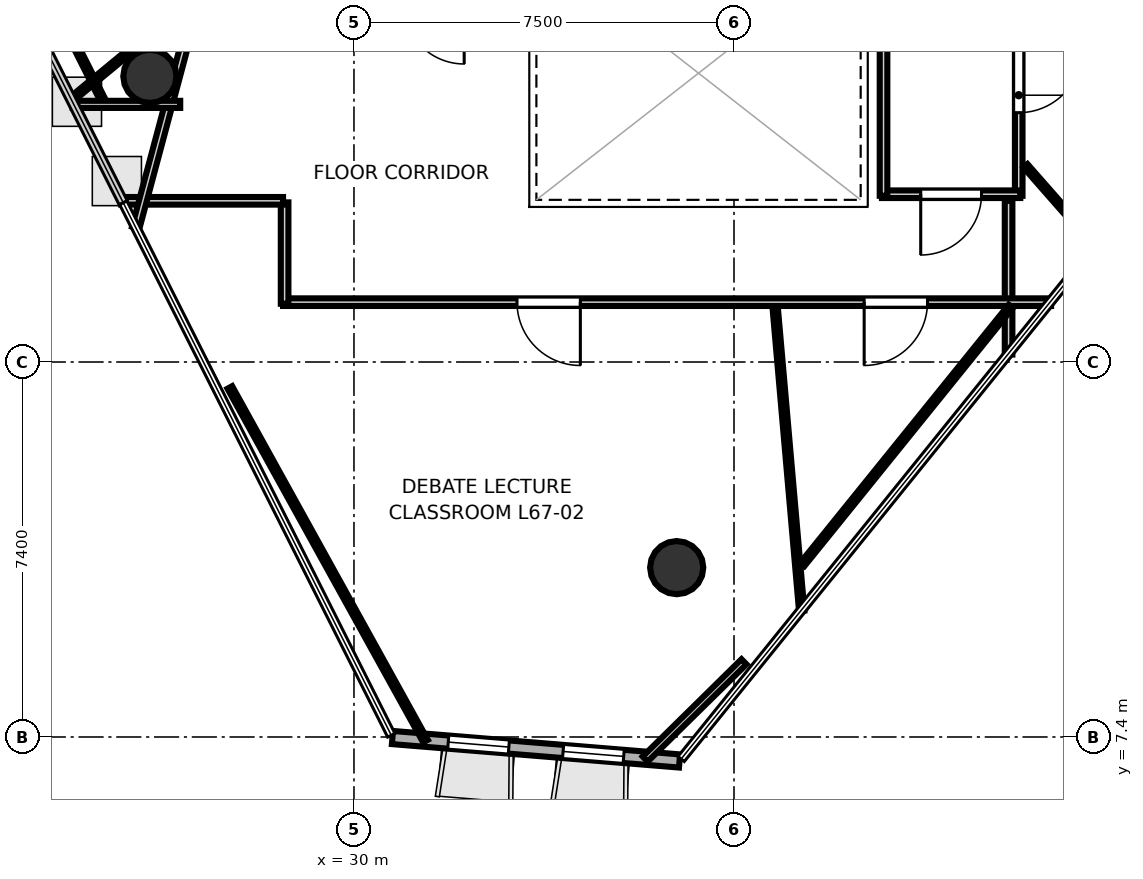
"""IFC4 building model, lengths in metres.
Left out: names, types, materials, properties, quantities, classifications, styles, units other than length and angle.
Written with IfcOpenShell. Run it as: python <this file> out.ifc"""

import sys

from ifc_helpers import new_model, si_unit, direction, frame, frame_2d, origin, origin_2d, place, context, subcontext, project, spatial, rectangle, hollow_circle, extrude, element, fill, save


model = new_model("IFC4")
c1 = context("Model", 3, precision=1e-05, world=origin(), true_north=direction((0.0, 1.0)))
c2 = subcontext(c1, "Body", "Model", "MODEL_VIEW")
j1 = project(units=[si_unit("LENGTHUNIT", "METRE"), si_unit("PLANEANGLEUNIT", "RADIAN")], contexts=[c1])
p1 = place(None, origin())
s1 = spatial("IfcSite", under=j1, at=p1, CompositionType="ELEMENT")
p2 = place(p1, origin())
s2 = spatial("IfcBuilding", under=s1, at=p2, CompositionType="ELEMENT")
p3 = place(p2, frame((0.0, 0.0, 261.2)))
s3 = spatial("IfcBuildingStorey", under=s2, at=p3, CompositionType="ELEMENT", Elevation=261.2)
for number, where, z_axis, x_axis in (
    (1, (25.972, 20.437, 0.0), (0.0, 0.0, 1.0), (1.0, 0.0, 0.0)),
    (2, (36.369, 10.742, 0.0), (0.0, 0.0, 1.0), (1.0, 0.0, 0.0)),
):
    element("IfcColumn", number, at=place(p3, frame(where, z_axis=z_axis, x_axis=x_axis)), inside=s3, PredefinedType="COLUMN", context=c2, shape_type="SweptSolid", body=[
        extrude(hollow_circle(Radius=0.525, WallThickness=0.028, at=origin_2d()), origin(), (0.0, 0.0, 1.0), 3.7),
    ])
p4 = place(p3, frame((30.759, 7.389, 0.0), z_axis=(0.0, 0.0, 1.0), x_axis=(0.996686463462, -0.081339372708, 0.0)))
e3 = element("IfcWall", 3, at=p4, inside=s3, PredefinedType="SOLIDWALL", context=c2, shape_type="SweptSolid", body=[
    extrude(rectangle(XDim=5.685, YDim=0.26, at=frame_2d((2.842, 0.0))), origin(), (0.0, 0.0, 1.0), 3.52),
])
p5 = place(p4, frame((1.105, 0.0, 0.9)))
e4 = element("IfcOpeningElement", 4, at=p5, cuts=e3, PredefinedType="OPENING", context=c2, shape_type="SweptSolid", body=[
    extrude(rectangle(XDim=1.2, YDim=2.0, at=frame_2d((0.6, 1.0))), frame((0.0, 0.14, 0.0), z_axis=(0.0, -1.0, 0.0), x_axis=(1.0, 0.0, 0.0)), (0.0, 0.0, 1.0), 0.28),
])
p6 = place(p4, frame((3.379, 0.0, 0.9)))
e5 = element("IfcOpeningElement", 5, at=p6, cuts=e3, PredefinedType="OPENING", context=c2, shape_type="SweptSolid", body=[
    extrude(rectangle(XDim=1.2, YDim=2.0, at=frame_2d((0.6, 1.0))), frame((0.0, 0.14, 0.0), z_axis=(0.0, -1.0, 0.0), x_axis=(1.0, 0.0, 0.0)), (0.0, 0.0, 1.0), 0.28),
])
p7 = place(p3, frame((43.119, 22.05, 0.0), z_axis=(0.0, 0.0, 1.0), x_axis=(0.0, -1.0, 0.0)))
e6 = element("IfcWall", 6, at=p7, inside=s3, PredefinedType="PARTITIONING", context=c2, shape_type="SweptSolid", body=[
    extrude(rectangle(XDim=3.97, YDim=0.15, at=frame_2d((1.985, 0.0))), origin(), (0.0, 0.0, 1.0), 2.84),
])
p8 = place(p7, frame((1.08, 0.0, 0.0)))
e7 = element("IfcOpeningElement", 7, at=p8, cuts=e6, PredefinedType="OPENING", context=c2, shape_type="SweptSolid", body=[
    extrude(rectangle(XDim=1.25, YDim=2.2, at=frame_2d((0.625, 1.1))), frame((0.0, 0.085, 0.0), z_axis=(0.0, -1.0, 0.0), x_axis=(1.0, 0.0, 0.0)), (0.0, 0.0, 1.0), 0.17),
])
p9 = place(p3, frame((43.15, 18.111, 0.0), z_axis=(0.0, 0.0, 1.0), x_axis=(-1.0, 0.0, 0.0)))
e8 = element("IfcWall", 8, at=p9, inside=s3, PredefinedType="PARTITIONING", context=c2, shape_type="SweptSolid", body=[
    extrude(rectangle(XDim=2.73, YDim=0.15, at=frame_2d((1.365, 0.0))), origin(), (0.0, 0.0, 1.0), 2.84),
])
p10 = place(p9, frame((0.765, 0.0, 0.0)))
e9 = element("IfcOpeningElement", 9, at=p10, cuts=e8, PredefinedType="OPENING", context=c2, shape_type="SweptSolid", body=[
    extrude(rectangle(XDim=1.2, YDim=2.15, at=frame_2d((0.6, 1.075))), frame((0.0, 0.085, 0.0), z_axis=(0.0, -1.0, 0.0), x_axis=(1.0, 0.0, 0.0)), (0.0, 0.0, 1.0), 0.17),
])
p11 = place(p3, frame((40.451, 18.08, 0.0), z_axis=(0.0, 0.0, 1.0), x_axis=(0.0, 1.0, 0.0)))
e10 = element("IfcWall", 10, at=p11, inside=s3, PredefinedType="PARTITIONING", context=c2, shape_type="SweptSolid", body=[
    extrude(rectangle(XDim=3.32, YDim=0.15, at=frame_2d((1.66, 0.0))), origin(), (0.0, 0.0, 1.0), 2.84),
])
p12 = place(p3, frame((42.919, 17.98, 0.0), z_axis=(0.0, 0.0, 1.0), x_axis=(0.0, -1.0, 0.0)))
e11 = element("IfcWall", 11, at=p12, inside=s3, PredefinedType="PARTITIONING", context=c2, shape_type="SweptSolid", body=[
    extrude(rectangle(XDim=3.032, YDim=0.15, at=frame_2d((1.516, 0.0))), origin(), (0.0, 0.0, 1.0), 2.84),
])
p13 = place(p3, frame((43.758, 15.981, 0.0), z_axis=(0.0, 0.0, 1.0), x_axis=(-1.0, 0.0, 0.0)))
e12 = element("IfcWall", 12, at=p13, inside=s3, PredefinedType="PARTITIONING", context=c2, shape_type="SweptSolid", body=[
    extrude(rectangle(XDim=15.158, YDim=0.15, at=frame_2d((7.579, 0.0))), origin(), (0.0, 0.0, 1.0), 2.84),
])
p14 = place(p13, frame((9.29, 0.0, 0.0)))
e13 = element("IfcOpeningElement", 13, at=p14, cuts=e12, PredefinedType="OPENING", context=c2, shape_type="SweptSolid", body=[
    extrude(rectangle(XDim=1.25, YDim=2.2, at=frame_2d((0.625, 1.1))), frame((0.0, 0.085, 0.0), z_axis=(0.0, -1.0, 0.0), x_axis=(1.0, 0.0, 0.0)), (0.0, 0.0, 1.0), 0.17),
])
p15 = place(p13, frame((2.439, 0.0, 0.0)))
e14 = element("IfcOpeningElement", 14, at=p15, cuts=e12, PredefinedType="OPENING", context=c2, shape_type="SweptSolid", body=[
    extrude(rectangle(XDim=1.25, YDim=2.2, at=frame_2d((0.625, 1.1))), frame((0.0, 0.085, 0.0), z_axis=(0.0, -1.0, 0.0), x_axis=(1.0, 0.0, 0.0)), (0.0, 0.0, 1.0), 0.17),
])
p16 = place(p3, frame((28.631, 15.95, 0.0), z_axis=(0.0, 0.0, 1.0), x_axis=(0.0, 1.0, 0.0)))
e15 = element("IfcWall", 15, at=p16, inside=s3, PredefinedType="PARTITIONING", context=c2, shape_type="SweptSolid", body=[
    extrude(rectangle(XDim=2.0, YDim=0.15, at=frame_2d((1.0, 0.0))), origin(), (0.0, 0.0, 1.0), 2.84),
])
p17 = place(p3, frame((28.6, 17.981, 0.0), z_axis=(0.0, 0.0, 1.0), x_axis=(-1.0, 0.0, 0.0)))
e16 = element("IfcWall", 16, at=p17, inside=s3, PredefinedType="PARTITIONING", context=c2, shape_type="SweptSolid", body=[
    extrude(rectangle(XDim=3.193, YDim=0.15, at=frame_2d((1.596, 0.0))), origin(), (0.0, 0.0, 1.0), 2.84),
])
p18 = place(p3, frame((25.693, 17.453, 0.0), z_axis=(0.0, 0.0, 1.0), x_axis=(0.258115276845, 0.966114125691, 0.0)))
e17 = element("IfcWall", 17, at=p18, inside=s3, PredefinedType="PARTITIONING", context=c2, shape_type="SweptSolid", body=[
    extrude(rectangle(XDim=3.827, YDim=0.15, at=frame_2d((1.914, 0.0))), origin(), (0.0, 0.0, 1.0), 2.84),
])
p19 = place(p3, frame((25.814, 21.132, 0.0), z_axis=(0.0, 0.0, 1.0), x_axis=(-0.771278190756, -0.636498195177, 0.0)))
e18 = element("IfcWall", 18, at=p19, inside=s3, PredefinedType="PARTITIONING", context=c2, shape_type="SweptSolid", body=[
    extrude(rectangle(XDim=1.828, YDim=0.105, at=frame_2d((0.914, 0.0))), origin(), (0.0, 0.0, 1.0), 2.84),
])
p20 = place(p3, frame((25.021, 20.013, 0.0), z_axis=(0.0, 0.0, 1.0), x_axis=(-0.449626242434, 0.893216794577, 0.0)))
e19 = element("IfcWall", 19, at=p20, inside=s3, PredefinedType="PARTITIONING", context=c2, shape_type="SweptSolid", body=[
    extrude(rectangle(XDim=11.205, YDim=0.105, at=frame_2d((5.602, 0.0))), origin(), (0.0, 0.0, 1.0), 2.84),
])
p21 = place(p3, frame((38.313, 15.867, 0.0), z_axis=(0.0, 0.0, 1.0), x_axis=(0.087163416737, -0.996194026675, 0.0)))
e20 = element("IfcWall", 20, at=p21, inside=s3, PredefinedType="PARTITIONING", context=c2, shape_type="SweptSolid", body=[
    extrude(rectangle(XDim=6.0, YDim=0.105, at=frame_2d((3.0, 0.0))), origin(), (0.0, 0.0, 1.0), 2.84),
])
p22 = place(p3, frame((37.697, 8.884, 0.0), z_axis=(0.0, 0.0, 1.0), x_axis=(-0.712707537724, -0.701461307323, 0.0)))
e21 = element("IfcWall", 21, at=p22, inside=s3, PredefinedType="PARTITIONING", context=c2, shape_type="SweptSolid", body=[
    extrude(rectangle(XDim=2.735, YDim=0.14, at=frame_2d((1.368, 0.0))), origin(), (0.0, 0.0, 1.0), 2.84),
])
p23 = place(p3, frame((31.411, 7.319, 0.0), z_axis=(0.0, 0.0, 1.0), x_axis=(-0.48414266405, 0.874989074701, 0.0)))
e22 = element("IfcWall", 22, at=p23, inside=s3, PredefinedType="PARTITIONING", context=c2, shape_type="SweptSolid", body=[
    extrude(rectangle(XDim=7.976, YDim=0.105, at=frame_2d((3.988, 0.0))), origin(), (0.0, 0.0, 1.0), 2.84),
])
p24 = place(p3, frame((24.449, 19.884, 0.0), z_axis=(0.0, 0.0, 1.0), x_axis=(1.0, 0.0, 0.0)))
e23 = element("IfcWall", 23, at=p24, inside=s3, PredefinedType="PARTITIONING", context=c2, shape_type="SweptSolid", body=[
    extrude(rectangle(XDim=2.121, YDim=0.14, at=frame_2d((1.061, 0.0))), origin(), (0.0, 0.0, 1.0), 2.84),
])
p25 = place(p3, frame((42.963, 15.898, 0.0), z_axis=(0.0, 0.0, 1.0), x_axis=(-0.628353599123, -0.777927859425, 0.0)))
e24 = element("IfcWall", 24, at=p25, inside=s3, PredefinedType="PARTITIONING", context=c2, shape_type="SweptSolid", body=[
    extrude(rectangle(XDim=6.547, YDim=0.105, at=frame_2d((3.273, 0.0))), origin(), (0.0, 0.0, 1.0), 2.84),
])
p26 = place(p3, frame((44.65, 17.08, 0.0), z_axis=(0.0, 0.0, 1.0), x_axis=(-0.659728126863, 0.751504357024, 0.0)))
e25 = element("IfcWall", 25, at=p26, inside=s3, PredefinedType="PARTITIONING", context=c2, shape_type="SweptSolid", body=[
    extrude(rectangle(XDim=2.117, YDim=0.105, at=frame_2d((1.059, 0.0))), origin(), (0.0, 0.0, 1.0), 2.84),
])
p27 = place(p10, origin())
e26 = element("IfcDoor", 26, at=p27, inside=s3, OperationType="SINGLE_SWING_RIGHT", PredefinedType="DOOR", context=c2, shape_type="SweptSolid", body=[
    extrude(rectangle(XDim=1.2, YDim=2.15, at=frame_2d((0.6, 1.075))), frame((0.0, 0.025, 0.0), z_axis=(0.0, -1.0, 0.0), x_axis=(1.0, 0.0, 0.0)), (0.0, 0.0, 1.0), 0.05),
])
fill(e9, e26)
p28 = place(p14, origin())
e27 = element("IfcDoor", 27, at=p28, inside=s3, OperationType="SINGLE_SWING_LEFT", PredefinedType="DOOR", context=c2, shape_type="SweptSolid", body=[
    extrude(rectangle(XDim=1.25, YDim=2.2, at=frame_2d((0.625, 1.1))), frame((0.0, 0.025, 0.0), z_axis=(0.0, -1.0, 0.0), x_axis=(1.0, 0.0, 0.0)), (0.0, 0.0, 1.0), 0.05),
])
fill(e13, e27)
p29 = place(p15, origin())
e28 = element("IfcDoor", 28, at=p29, inside=s3, OperationType="SINGLE_SWING_RIGHT", PredefinedType="DOOR", context=c2, shape_type="SweptSolid", body=[
    extrude(rectangle(XDim=1.25, YDim=2.2, at=frame_2d((0.625, 1.1))), frame((0.0, 0.025, 0.0), z_axis=(0.0, -1.0, 0.0), x_axis=(1.0, 0.0, 0.0)), (0.0, 0.0, 1.0), 0.05),
])
fill(e14, e28)
p30 = place(p8, origin())
e29 = element("IfcDoor", 29, at=p30, inside=s3, OperationType="SINGLE_SWING_LEFT", PredefinedType="DOOR", context=c2, shape_type="SweptSolid", body=[
    extrude(rectangle(XDim=1.25, YDim=2.2, at=frame_2d((0.625, 1.1))), frame((0.0, 0.025, 0.0), z_axis=(0.0, -1.0, 0.0), x_axis=(1.0, 0.0, 0.0)), (0.0, 0.0, 1.0), 0.05),
])
fill(e7, e29)
p31 = place(p5, origin())
e30 = element("IfcWindow", 30, at=p31, inside=s3, PartitioningType="SINGLE_PANEL", PredefinedType="WINDOW", context=c2, shape_type="SweptSolid", body=[
    extrude(rectangle(XDim=1.2, YDim=2.0, at=frame_2d((0.6, 1.0))), frame((0.0, 0.03, 0.0), z_axis=(0.0, -1.0, 0.0), x_axis=(1.0, 0.0, 0.0)), (0.0, 0.0, 1.0), 0.06),
])
fill(e4, e30)
p32 = place(p6, origin())
e31 = element("IfcWindow", 31, at=p32, inside=s3, PartitioningType="SINGLE_PANEL", PredefinedType="WINDOW", context=c2, shape_type="SweptSolid", body=[
    extrude(rectangle(XDim=1.2, YDim=2.0, at=frame_2d((0.6, 1.0))), frame((0.0, 0.03, 0.0), z_axis=(0.0, -1.0, 0.0), x_axis=(1.0, 0.0, 0.0)), (0.0, 0.0, 1.0), 0.06),
])
fill(e5, e31)
save(model, sys.argv[1])
